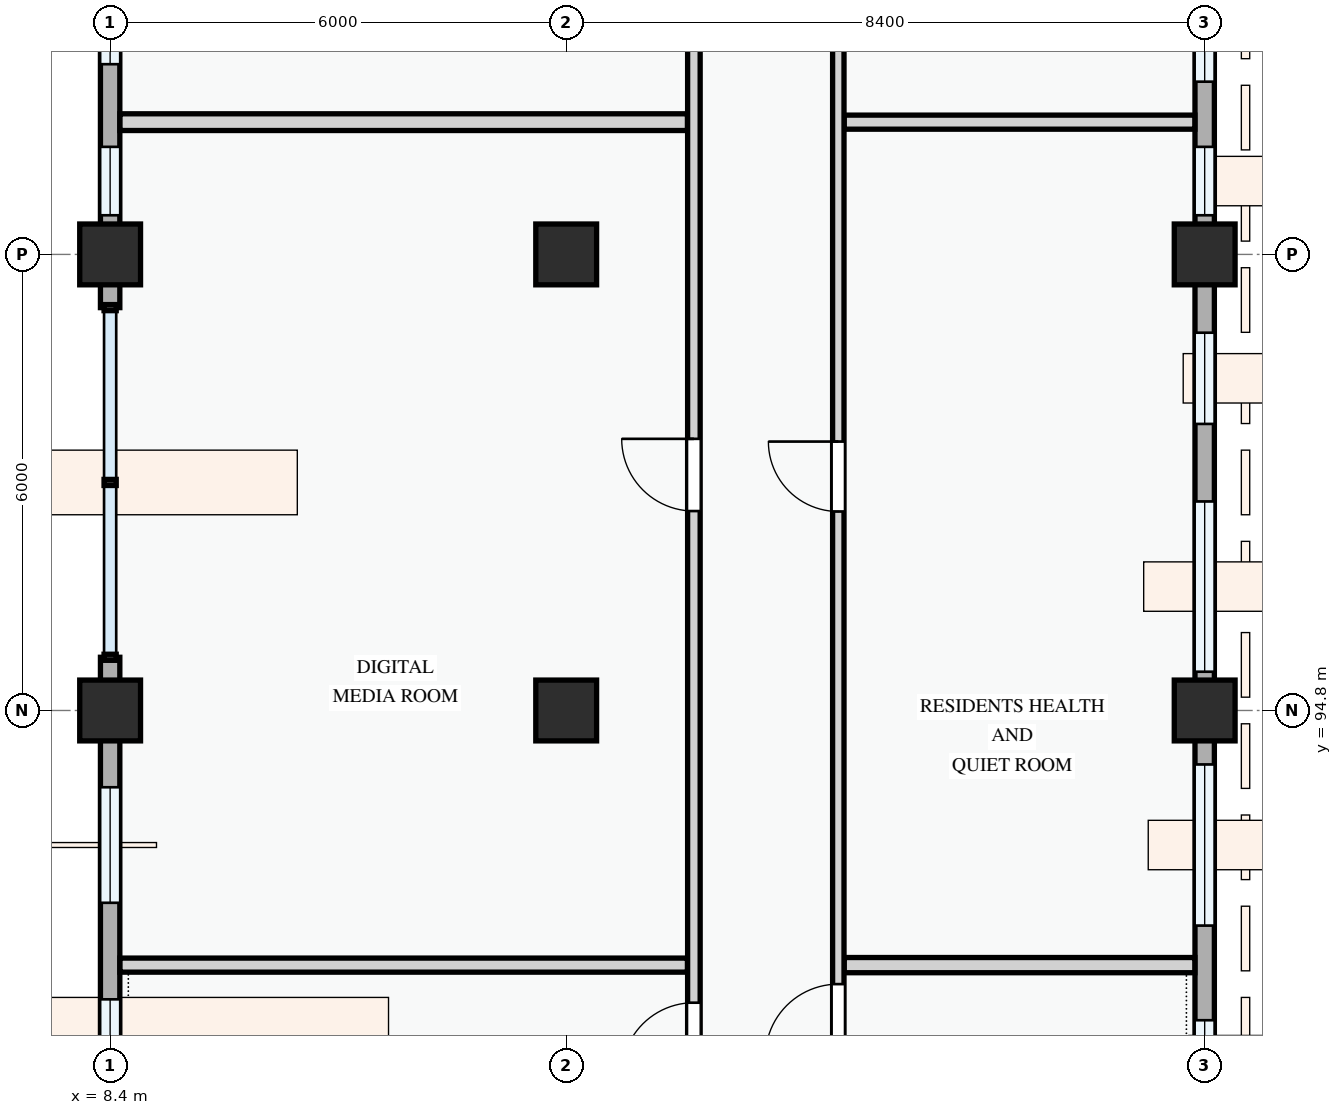
"""IFC4 building model, lengths in metres.
Left out: names, types, materials, properties, quantities, classifications, styles, units other than length and angle.
Written with IfcOpenShell. Run it as: python <this file> out.ifc"""

import sys

from ifc_helpers import new_model, si_unit, direction, frame, frame_2d, origin, origin_2d, place, context, subcontext, project, spatial, rectangle, extrude, element, fill, save


model = new_model("IFC4")
c1 = context("Model", 3, precision=1e-05, world=origin(), true_north=direction((0.0, 1.0)))
c2 = subcontext(c1, "Body", "Model", "MODEL_VIEW")
j1 = project(units=[si_unit("LENGTHUNIT", "METRE"), si_unit("PLANEANGLEUNIT", "RADIAN")], contexts=[c1])
p1 = place(None, origin())
s1 = spatial("IfcSite", under=j1, at=p1, CompositionType="ELEMENT")
p2 = place(p1, origin())
s2 = spatial("IfcBuilding", under=s1, at=p2, CompositionType="ELEMENT")
p3 = place(p2, frame((0.0, 0.0, 4.5)))
s3 = spatial("IfcBuildingStorey", under=s2, at=p3, CompositionType="ELEMENT", Elevation=4.5)
for number, where, z_axis, x_axis in (
    (1, (8.4, 94.8, 0.0), (0.0, 0.0, 1.0), (1.0, 0.0, 0.0)),
    (2, (8.4, 100.8, 0.0), (0.0, 0.0, 1.0), (1.0, 0.0, 0.0)),
    (3, (14.4, 94.8, 0.0), (0.0, 0.0, 1.0), (1.0, 0.0, 0.0)),
    (4, (14.4, 100.8, 0.0), (0.0, 0.0, 1.0), (1.0, 0.0, 0.0)),
    (5, (22.8, 94.8, 0.0), (0.0, 0.0, 1.0), (1.0, 0.0, 0.0)),
    (6, (22.8, 100.8, 0.0), (0.0, 0.0, 1.0), (1.0, 0.0, 0.0)),
):
    element("IfcColumn", number, at=place(p3, frame(where, z_axis=z_axis, x_axis=x_axis)), inside=s3, PredefinedType="COLUMN", context=c2, shape_type="SweptSolid", body=[
        extrude(rectangle(XDim=0.8, YDim=0.8, at=origin_2d()), origin(), (0.0, 0.0, 1.0), 3.6),
    ])
p4 = place(p3, frame((8.4, 109.2, 0.0), z_axis=(0.0, 0.0, 1.0), x_axis=(0.0, -1.0, 0.0)))
e7 = element("IfcWall", 7, at=p4, inside=s3, PredefinedType="STANDARD", context=c2, shape_type="SweptSolid", body=[
    extrude(rectangle(XDim=8.4, YDim=0.255, at=frame_2d((4.2, 0.0))), origin(), (0.0, 0.0, 1.0), 2.725),
])
p5 = place(p4, frame((1.133, 0.0, 0.78)))
e8 = element("IfcOpeningElement", 8, at=p5, cuts=e7, PredefinedType="OPENING", context=c2, shape_type="SweptSolid", body=[
    extrude(rectangle(XDim=1.42, YDim=1.38, at=frame_2d((0.71, 0.69))), frame((0.0, 0.137, 0.0), z_axis=(0.0, -1.0, 0.0), x_axis=(1.0, 0.0, 0.0)), (0.0, 0.0, 1.0), 0.275),
])
p6 = place(p4, frame((4.117, 0.0, 0.78)))
e9 = element("IfcOpeningElement", 9, at=p6, cuts=e7, PredefinedType="OPENING", context=c2, shape_type="SweptSolid", body=[
    extrude(rectangle(XDim=1.78, YDim=1.42, at=frame_2d((0.89, 0.71))), frame((0.0, 0.137, 0.0), z_axis=(0.0, -1.0, 0.0), x_axis=(1.0, 0.0, 0.0)), (0.0, 0.0, 1.0), 0.275),
])
p7 = place(p4, frame((6.985, 0.0, 0.78)))
e10 = element("IfcOpeningElement", 10, at=p7, cuts=e7, PredefinedType="OPENING", context=c2, shape_type="SweptSolid", body=[
    extrude(rectangle(XDim=0.9, YDim=1.2, at=frame_2d((0.45, 0.6))), frame((0.0, 0.137, 0.0), z_axis=(0.0, -1.0, 0.0), x_axis=(1.0, 0.0, 0.0)), (0.0, 0.0, 1.0), 0.275),
])
p8 = place(p3, frame((8.4, 100.8, 0.0), z_axis=(0.0, 0.0, 1.0), x_axis=(0.0, -1.0, 0.0)))
e11 = element("IfcWall", 11, at=p8, inside=s3, PredefinedType="STANDARD", context=c2, shape_type="SweptSolid", body=[
    extrude(rectangle(XDim=0.7, YDim=0.255, at=frame_2d((0.35, 0.0))), origin(), (0.0, 0.0, 1.0), 2.875),
])
p9 = place(p3, frame((8.4, 95.5, 0.0), z_axis=(0.0, 0.0, 1.0), x_axis=(0.0, -1.0, 0.0)))
e12 = element("IfcWall", 12, at=p9, inside=s3, PredefinedType="STANDARD", context=c2, shape_type="SweptSolid", body=[
    extrude(rectangle(XDim=0.7, YDim=0.255, at=frame_2d((0.35, 0.0))), origin(), (0.0, 0.0, 1.0), 3.34),
])
p10 = place(p3, frame((8.4, 94.8, 0.0), z_axis=(0.0, 0.0, 1.0), x_axis=(0.0, -1.0, 0.0)))
e13 = element("IfcWall", 13, at=p10, inside=s3, PredefinedType="STANDARD", context=c2, shape_type="SweptSolid", body=[
    extrude(rectangle(XDim=8.4, YDim=0.255, at=frame_2d((4.2, 0.0))), origin(), (0.0, 0.0, 1.0), 2.725),
])
p11 = place(p10, frame((1.01, 0.0, 0.78)))
e14 = element("IfcOpeningElement", 14, at=p11, cuts=e13, PredefinedType="OPENING", context=c2, shape_type="SweptSolid", body=[
    extrude(rectangle(XDim=1.52, YDim=1.42, at=frame_2d((0.76, 0.71))), frame((0.0, 0.137, 0.0), z_axis=(0.0, -1.0, 0.0), x_axis=(1.0, 0.0, 0.0)), (0.0, 0.0, 1.0), 0.275),
])
p12 = place(p10, frame((3.8, 0.0, 0.78)))
e15 = element("IfcOpeningElement", 15, at=p12, cuts=e13, PredefinedType="OPENING", context=c2, shape_type="SweptSolid", body=[
    extrude(rectangle(XDim=1.6, YDim=1.75, at=frame_2d((0.8, 0.875))), frame((0.0, 0.137, 0.0), z_axis=(0.0, -1.0, 0.0), x_axis=(1.0, 0.0, 0.0)), (0.0, 0.0, 1.0), 0.275),
])
p13 = place(p10, frame((6.01, 0.0, 0.78)))
e16 = element("IfcOpeningElement", 16, at=p13, cuts=e13, PredefinedType="OPENING", context=c2, shape_type="SweptSolid", body=[
    extrude(rectangle(XDim=1.9, YDim=1.55, at=frame_2d((0.95, 0.775))), frame((0.0, 0.137, 0.0), z_axis=(0.0, -1.0, 0.0), x_axis=(1.0, 0.0, 0.0)), (0.0, 0.0, 1.0), 0.275),
])
p14 = place(p3, frame((22.8, 86.4, 0.0), z_axis=(0.0, 0.0, 1.0), x_axis=(0.0, 1.0, 0.0)))
e17 = element("IfcWall", 17, at=p14, inside=s3, PredefinedType="STANDARD", context=c2, shape_type="SweptSolid", body=[
    extrude(rectangle(XDim=8.4, YDim=0.255, at=frame_2d((4.2, 0.0))), origin(), (0.0, 0.0, 1.0), 2.725),
])
p15 = place(p14, frame((0.59, 0.0, 0.78)))
e18 = element("IfcOpeningElement", 18, at=p15, cuts=e17, PredefinedType="OPENING", context=c2, shape_type="SweptSolid", body=[
    extrude(rectangle(XDim=1.7, YDim=1.6, at=frame_2d((0.85, 0.8))), frame((0.0, 0.137, 0.0), z_axis=(0.0, -1.0, 0.0), x_axis=(1.0, 0.0, 0.0)), (0.0, 0.0, 1.0), 0.275),
])
p16 = place(p14, frame((3.275, 0.0, 0.78)))
e19 = element("IfcOpeningElement", 19, at=p16, cuts=e17, PredefinedType="OPENING", context=c2, shape_type="SweptSolid", body=[
    extrude(rectangle(XDim=1.05, YDim=1.2, at=frame_2d((0.525, 0.6))), frame((0.0, 0.137, 0.0), z_axis=(0.0, -1.0, 0.0), x_axis=(1.0, 0.0, 0.0)), (0.0, 0.0, 1.0), 0.275),
])
p17 = place(p14, frame((5.57, 0.0, 0.78)))
e20 = element("IfcOpeningElement", 20, at=p17, cuts=e17, PredefinedType="OPENING", context=c2, shape_type="SweptSolid", body=[
    extrude(rectangle(XDim=2.12, YDim=1.44, at=frame_2d((1.06, 0.72))), frame((0.0, 0.137, 0.0), z_axis=(0.0, -1.0, 0.0), x_axis=(1.0, 0.0, 0.0)), (0.0, 0.0, 1.0), 0.275),
])
p18 = place(p3, frame((22.8, 94.8, 0.0), z_axis=(0.0, 0.0, 1.0), x_axis=(0.0, 1.0, 0.0)))
e21 = element("IfcWall", 21, at=p18, inside=s3, PredefinedType="STANDARD", context=c2, shape_type="SweptSolid", body=[
    extrude(rectangle(XDim=6.0, YDim=0.255, at=frame_2d((3.0, 0.0))), origin(), (0.0, 0.0, 1.0), 2.875),
])
p19 = place(p18, frame((0.51, 0.0, 0.78)))
e22 = element("IfcOpeningElement", 22, at=p19, cuts=e21, PredefinedType="OPENING", context=c2, shape_type="SweptSolid", body=[
    extrude(rectangle(XDim=2.24, YDim=1.52, at=frame_2d((1.12, 0.76))), frame((0.0, 0.137, 0.0), z_axis=(0.0, -1.0, 0.0), x_axis=(1.0, 0.0, 0.0)), (0.0, 0.0, 1.0), 0.275),
])
p20 = place(p18, frame((3.77, 0.0, 0.78)))
e23 = element("IfcOpeningElement", 23, at=p20, cuts=e21, PredefinedType="OPENING", context=c2, shape_type="SweptSolid", body=[
    extrude(rectangle(XDim=1.2, YDim=1.5, at=frame_2d((0.6, 0.75))), frame((0.0, 0.137, 0.0), z_axis=(0.0, -1.0, 0.0), x_axis=(1.0, 0.0, 0.0)), (0.0, 0.0, 1.0), 0.275),
])
p21 = place(p3, frame((22.8, 100.8, 0.0), z_axis=(0.0, 0.0, 1.0), x_axis=(0.0, 1.0, 0.0)))
e24 = element("IfcWall", 24, at=p21, inside=s3, PredefinedType="STANDARD", context=c2, shape_type="SweptSolid", body=[
    extrude(rectangle(XDim=8.4, YDim=0.255, at=frame_2d((4.2, 0.0))), origin(), (0.0, 0.0, 1.0), 2.725),
])
p22 = place(p21, frame((0.515, 0.0, 0.78)))
e25 = element("IfcOpeningElement", 25, at=p22, cuts=e24, PredefinedType="OPENING", context=c2, shape_type="SweptSolid", body=[
    extrude(rectangle(XDim=0.9, YDim=1.2, at=frame_2d((0.45, 0.6))), frame((0.0, 0.137, 0.0), z_axis=(0.0, -1.0, 0.0), x_axis=(1.0, 0.0, 0.0)), (0.0, 0.0, 1.0), 0.275),
])
p23 = place(p21, frame((2.272, 0.0, 0.78)))
e26 = element("IfcOpeningElement", 26, at=p23, cuts=e24, PredefinedType="OPENING", context=c2, shape_type="SweptSolid", body=[
    extrude(rectangle(XDim=2.24, YDim=1.52, at=frame_2d((1.12, 0.76))), frame((0.0, 0.137, 0.0), z_axis=(0.0, -1.0, 0.0), x_axis=(1.0, 0.0, 0.0)), (0.0, 0.0, 1.0), 0.275),
])
p24 = place(p21, frame((5.268, 0.0, 0.78)))
e27 = element("IfcOpeningElement", 27, at=p24, cuts=e24, PredefinedType="OPENING", context=c2, shape_type="SweptSolid", body=[
    extrude(rectangle(XDim=2.58, YDim=1.48, at=frame_2d((1.29, 0.74))), frame((0.0, 0.137, 0.0), z_axis=(0.0, -1.0, 0.0), x_axis=(1.0, 0.0, 0.0)), (0.0, 0.0, 1.0), 0.275),
])
p25 = place(p3, frame((8.53, 91.45, 0.0), z_axis=(0.0, 0.0, 1.0), x_axis=(1.0, 0.0, 0.0)))
e28 = element("IfcWall", 28, at=p25, inside=s3, PredefinedType="PARTITIONING", context=c2, shape_type="SweptSolid", body=[
    extrude(rectangle(XDim=7.466, YDim=0.185, at=frame_2d((3.733, 0.0))), origin(), (0.0, 0.0, 1.0), 3.3),
])
p26 = place(p3, frame((18.057, 91.45, 0.0), z_axis=(0.0, 0.0, 1.0), x_axis=(1.0, 0.0, 0.0)))
e29 = element("IfcWall", 29, at=p26, inside=s3, PredefinedType="PARTITIONING", context=c2, shape_type="SweptSolid", body=[
    extrude(rectangle(XDim=4.614, YDim=0.2, at=frame_2d((2.307, 0.0))), origin(), (0.0, 0.0, 1.0), 3.3),
])
p27 = place(p3, frame((8.53, 102.54, 0.0), z_axis=(0.0, 0.0, 1.0), x_axis=(1.0, 0.0, 0.0)))
e30 = element("IfcWall", 30, at=p27, inside=s3, PredefinedType="PARTITIONING", context=c2, shape_type="SweptSolid", body=[
    extrude(rectangle(XDim=7.466, YDim=0.22, at=frame_2d((3.733, 0.0))), origin(), (0.0, 0.0, 1.0), 3.3),
])
p28 = place(p3, frame((18.057, 102.54, 0.0), z_axis=(0.0, 0.0, 1.0), x_axis=(1.0, 0.0, 0.0)))
e31 = element("IfcWall", 31, at=p28, inside=s3, PredefinedType="PARTITIONING", context=c2, shape_type="SweptSolid", body=[
    extrude(rectangle(XDim=4.614, YDim=0.185, at=frame_2d((2.307, 0.0))), origin(), (0.0, 0.0, 1.0), 3.3),
])
p29 = place(p3, frame((16.08, 72.06, 0.0), z_axis=(0.0, 0.0, 1.0), x_axis=(0.0, 1.0, 0.0)))
e32 = element("IfcWall", 32, at=p29, inside=s3, PredefinedType="PARTITIONING", context=c2, shape_type="SweptSolid", body=[
    extrude(rectangle(XDim=37.28, YDim=0.165, at=frame_2d((18.64, 0.0))), origin(), (0.0, 0.0, 1.0), 3.3),
])
p30 = place(p29, frame((3.772, 0.0, 0.0)))
e33 = element("IfcOpeningElement", 33, at=p30, cuts=e32, PredefinedType="OPENING", context=c2, shape_type="SweptSolid", body=[
    extrude(rectangle(XDim=0.95, YDim=2.1, at=frame_2d((0.475, 1.05))), frame((0.0, 0.093, 0.0), z_axis=(0.0, -1.0, 0.0), x_axis=(1.0, 0.0, 0.0)), (0.0, 0.0, 1.0), 0.185),
])
p31 = place(p29, frame((17.946, 0.0, 0.0)))
e34 = element("IfcOpeningElement", 34, at=p31, cuts=e32, PredefinedType="OPENING", context=c2, shape_type="SweptSolid", body=[
    extrude(rectangle(XDim=0.95, YDim=2.1, at=frame_2d((0.475, 1.05))), frame((0.0, 0.093, 0.0), z_axis=(0.0, -1.0, 0.0), x_axis=(1.0, 0.0, 0.0)), (0.0, 0.0, 1.0), 0.185),
])
p32 = place(p29, frame((25.364, 0.0, 0.0)))
e35 = element("IfcOpeningElement", 35, at=p32, cuts=e32, PredefinedType="OPENING", context=c2, shape_type="SweptSolid", body=[
    extrude(rectangle(XDim=0.95, YDim=2.1, at=frame_2d((0.475, 1.05))), frame((0.0, 0.093, 0.0), z_axis=(0.0, -1.0, 0.0), x_axis=(1.0, 0.0, 0.0)), (0.0, 0.0, 1.0), 0.185),
])
p33 = place(p29, frame((32.402, 0.0, 0.0)))
e36 = element("IfcOpeningElement", 36, at=p33, cuts=e32, PredefinedType="OPENING", context=c2, shape_type="SweptSolid", body=[
    extrude(rectangle(XDim=0.95, YDim=2.1, at=frame_2d((0.475, 1.05))), frame((0.0, 0.093, 0.0), z_axis=(0.0, -1.0, 0.0), x_axis=(1.0, 0.0, 0.0)), (0.0, 0.0, 1.0), 0.185),
])
p34 = place(p3, frame((17.98, 72.06, 0.0), z_axis=(0.0, 0.0, 1.0), x_axis=(0.0, 1.0, 0.0)))
e37 = element("IfcWall", 37, at=p34, inside=s3, PredefinedType="PARTITIONING", context=c2, shape_type="SweptSolid", body=[
    extrude(rectangle(XDim=37.28, YDim=0.15, at=frame_2d((18.64, 0.0))), origin(), (0.0, 0.0, 1.0), 3.3),
])
p35 = place(p34, frame((3.768, 0.0, 0.0)))
e38 = element("IfcOpeningElement", 38, at=p35, cuts=e37, PredefinedType="OPENING", context=c2, shape_type="SweptSolid", body=[
    extrude(rectangle(XDim=0.92, YDim=2.1, at=frame_2d((0.46, 1.05))), frame((0.0, 0.085, 0.0), z_axis=(0.0, -1.0, 0.0), x_axis=(1.0, 0.0, 0.0)), (0.0, 0.0, 1.0), 0.17),
])
p36 = place(p34, frame((18.18, 0.0, 0.0)))
e39 = element("IfcOpeningElement", 39, at=p36, cuts=e37, PredefinedType="OPENING", context=c2, shape_type="SweptSolid", body=[
    extrude(rectangle(XDim=0.96, YDim=2.12, at=frame_2d((0.48, 1.06))), frame((0.0, 0.085, 0.0), z_axis=(0.0, -1.0, 0.0), x_axis=(1.0, 0.0, 0.0)), (0.0, 0.0, 1.0), 0.17),
])
p37 = place(p34, frame((25.358, 0.0, 0.0)))
e40 = element("IfcOpeningElement", 40, at=p37, cuts=e37, PredefinedType="OPENING", context=c2, shape_type="SweptSolid", body=[
    extrude(rectangle(XDim=0.92, YDim=2.1, at=frame_2d((0.46, 1.05))), frame((0.0, 0.085, 0.0), z_axis=(0.0, -1.0, 0.0), x_axis=(1.0, 0.0, 0.0)), (0.0, 0.0, 1.0), 0.17),
])
p38 = place(p34, frame((32.399, 0.0, 0.0)))
e41 = element("IfcOpeningElement", 41, at=p38, cuts=e37, PredefinedType="OPENING", context=c2, shape_type="SweptSolid", body=[
    extrude(rectangle(XDim=0.92, YDim=2.1, at=frame_2d((0.46, 1.05))), frame((0.0, 0.085, 0.0), z_axis=(0.0, -1.0, 0.0), x_axis=(1.0, 0.0, 0.0)), (0.0, 0.0, 1.0), 0.17),
])
p39 = place(p6, origin())
e42 = element("IfcWindow", 42, at=p39, inside=s3, PartitioningType="DOUBLE_PANEL_VERTICAL", PredefinedType="WINDOW", context=c2, shape_type="SweptSolid", body=[
    extrude(rectangle(XDim=1.78, YDim=1.42, at=frame_2d((0.89, 0.71))), frame((0.0, 0.03, 0.0), z_axis=(0.0, -1.0, 0.0), x_axis=(1.0, 0.0, 0.0)), (0.0, 0.0, 1.0), 0.06),
])
fill(e9, e42)
p40 = place(p7, origin())
e43 = element("IfcWindow", 43, at=p40, inside=s3, PartitioningType="SINGLE_PANEL", PredefinedType="WINDOW", context=c2, shape_type="SweptSolid", body=[
    extrude(rectangle(XDim=0.9, YDim=1.2, at=frame_2d((0.45, 0.6))), frame((0.0, 0.03, 0.0), z_axis=(0.0, -1.0, 0.0), x_axis=(1.0, 0.0, 0.0)), (0.0, 0.0, 1.0), 0.06),
])
fill(e10, e43)
p41 = place(p11, origin())
e44 = element("IfcWindow", 44, at=p41, inside=s3, PartitioningType="SINGLE_PANEL", PredefinedType="WINDOW", context=c2, shape_type="SweptSolid", body=[
    extrude(rectangle(XDim=1.52, YDim=1.42, at=frame_2d((0.76, 0.71))), frame((0.0, 0.03, 0.0), z_axis=(0.0, -1.0, 0.0), x_axis=(1.0, 0.0, 0.0)), (0.0, 0.0, 1.0), 0.06),
])
fill(e14, e44)
p42 = place(p12, origin())
e45 = element("IfcWindow", 45, at=p42, inside=s3, PartitioningType="DOUBLE_PANEL_VERTICAL", PredefinedType="WINDOW", context=c2, shape_type="SweptSolid", body=[
    extrude(rectangle(XDim=1.6, YDim=1.75, at=frame_2d((0.8, 0.875))), frame((0.0, 0.03, 0.0), z_axis=(0.0, -1.0, 0.0), x_axis=(1.0, 0.0, 0.0)), (0.0, 0.0, 1.0), 0.06),
])
fill(e15, e45)
p43 = place(p16, origin())
e46 = element("IfcWindow", 46, at=p43, inside=s3, PartitioningType="SINGLE_PANEL", PredefinedType="WINDOW", context=c2, shape_type="SweptSolid", body=[
    extrude(rectangle(XDim=1.05, YDim=1.2, at=frame_2d((0.525, 0.6))), frame((0.0, 0.03, 0.0), z_axis=(0.0, -1.0, 0.0), x_axis=(1.0, 0.0, 0.0)), (0.0, 0.0, 1.0), 0.06),
])
fill(e19, e46)
p44 = place(p17, origin())
e47 = element("IfcWindow", 47, at=p44, inside=s3, PartitioningType="DOUBLE_PANEL_VERTICAL", PredefinedType="WINDOW", context=c2, shape_type="SweptSolid", body=[
    extrude(rectangle(XDim=2.12, YDim=1.44, at=frame_2d((1.06, 0.72))), frame((0.0, 0.03, 0.0), z_axis=(0.0, -1.0, 0.0), x_axis=(1.0, 0.0, 0.0)), (0.0, 0.0, 1.0), 0.06),
])
fill(e20, e47)
p45 = place(p19, origin())
e48 = element("IfcWindow", 48, at=p45, inside=s3, PartitioningType="DOUBLE_PANEL_VERTICAL", PredefinedType="WINDOW", context=c2, shape_type="SweptSolid", body=[
    extrude(rectangle(XDim=2.24, YDim=1.52, at=frame_2d((1.12, 0.76))), frame((0.0, 0.03, 0.0), z_axis=(0.0, -1.0, 0.0), x_axis=(1.0, 0.0, 0.0)), (0.0, 0.0, 1.0), 0.06),
])
fill(e22, e48)
p46 = place(p20, origin())
e49 = element("IfcWindow", 49, at=p46, inside=s3, PartitioningType="SINGLE_PANEL", PredefinedType="WINDOW", context=c2, shape_type="SweptSolid", body=[
    extrude(rectangle(XDim=1.2, YDim=1.5, at=frame_2d((0.6, 0.75))), frame((0.0, 0.03, 0.0), z_axis=(0.0, -1.0, 0.0), x_axis=(1.0, 0.0, 0.0)), (0.0, 0.0, 1.0), 0.06),
])
fill(e23, e49)
p47 = place(p22, origin())
e50 = element("IfcWindow", 50, at=p47, inside=s3, PartitioningType="SINGLE_PANEL", PredefinedType="WINDOW", context=c2, shape_type="SweptSolid", body=[
    extrude(rectangle(XDim=0.9, YDim=1.2, at=frame_2d((0.45, 0.6))), frame((0.0, 0.03, 0.0), z_axis=(0.0, -1.0, 0.0), x_axis=(1.0, 0.0, 0.0)), (0.0, 0.0, 1.0), 0.06),
])
fill(e25, e50)
p48 = place(p23, origin())
e51 = element("IfcWindow", 51, at=p48, inside=s3, PartitioningType="DOUBLE_PANEL_VERTICAL", PredefinedType="WINDOW", context=c2, shape_type="SweptSolid", body=[
    extrude(rectangle(XDim=2.24, YDim=1.52, at=frame_2d((1.12, 0.76))), frame((0.0, 0.03, 0.0), z_axis=(0.0, -1.0, 0.0), x_axis=(1.0, 0.0, 0.0)), (0.0, 0.0, 1.0), 0.06),
])
fill(e26, e51)
p49 = place(p31, origin())
e52 = element("IfcDoor", 52, at=p49, inside=s3, OperationType="SINGLE_SWING_LEFT", PredefinedType="DOOR", context=c2, shape_type="SweptSolid", body=[
    extrude(rectangle(XDim=0.95, YDim=2.1, at=frame_2d((0.475, 1.05))), frame((0.0, 0.025, 0.0), z_axis=(0.0, -1.0, 0.0), x_axis=(1.0, 0.0, 0.0)), (0.0, 0.0, 1.0), 0.05),
])
fill(e34, e52)
p50 = place(p32, origin())
e53 = element("IfcDoor", 53, at=p50, inside=s3, OperationType="SINGLE_SWING_RIGHT", PredefinedType="DOOR", context=c2, shape_type="SweptSolid", body=[
    extrude(rectangle(XDim=0.95, YDim=2.1, at=frame_2d((0.475, 1.05))), frame((0.0, 0.025, 0.0), z_axis=(0.0, -1.0, 0.0), x_axis=(1.0, 0.0, 0.0)), (0.0, 0.0, 1.0), 0.05),
])
fill(e35, e53)
p51 = place(p36, origin())
e54 = element("IfcDoor", 54, at=p51, inside=s3, OperationType="SINGLE_SWING_LEFT", PredefinedType="DOOR", context=c2, shape_type="SweptSolid", body=[
    extrude(rectangle(XDim=0.96, YDim=2.12, at=frame_2d((0.48, 1.06))), frame((0.0, 0.025, 0.0), z_axis=(0.0, -1.0, 0.0), x_axis=(1.0, 0.0, 0.0)), (0.0, 0.0, 1.0), 0.05),
])
fill(e39, e54)
p52 = place(p37, origin())
e55 = element("IfcDoor", 55, at=p52, inside=s3, OperationType="SINGLE_SWING_RIGHT", PredefinedType="DOOR", context=c2, shape_type="SweptSolid", body=[
    extrude(rectangle(XDim=0.92, YDim=2.1, at=frame_2d((0.46, 1.05))), frame((0.0, 0.025, 0.0), z_axis=(0.0, -1.0, 0.0), x_axis=(1.0, 0.0, 0.0)), (0.0, 0.0, 1.0), 0.05),
])
fill(e40, e55)
save(model, sys.argv[1])
